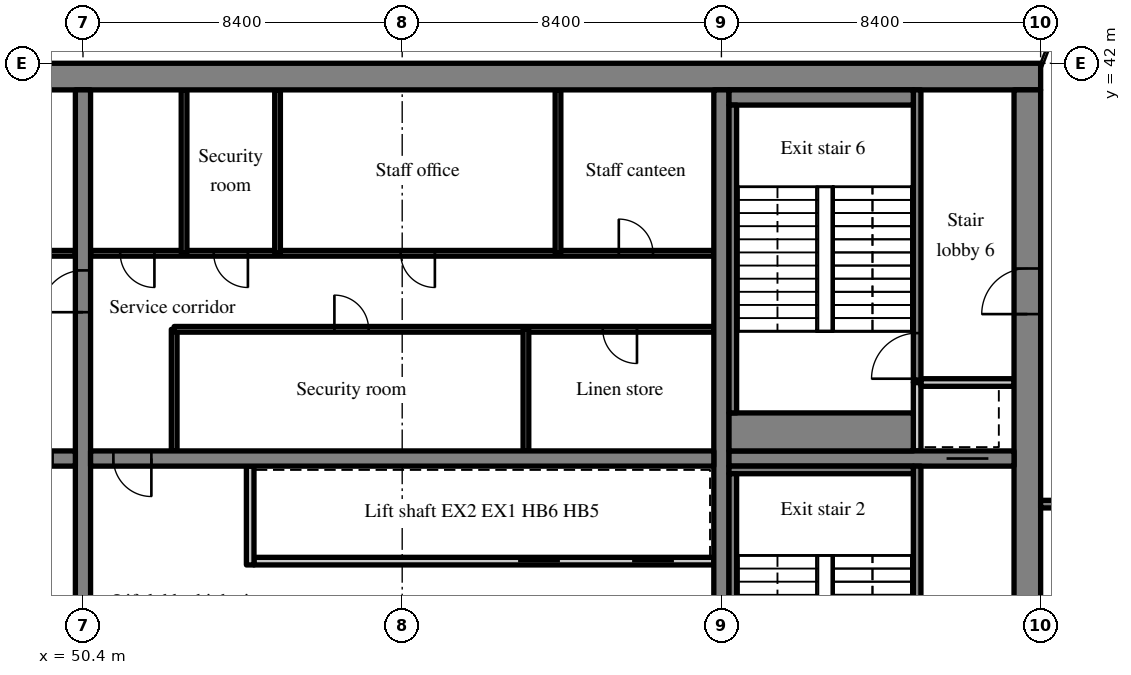
"""IFC4 building model, lengths in metres.
Left out: names, types, materials, properties, quantities, classifications, styles, units other than length and angle.
Written with IfcOpenShell. Run it as: python <this file> out.ifc"""

import sys

from ifc_helpers import new_model, si_unit, direction, frame, frame_2d, origin, place, context, subcontext, project, spatial, rectangle, extrude, source, transform, mapped, element, fill, save


model = new_model("IFC4")
c1 = context("Model", 3, precision=1e-05, world=origin(), true_north=direction((0.0, 1.0)))
c2 = subcontext(c1, "Body", "Model", "MODEL_VIEW")
j1 = project(units=[si_unit("LENGTHUNIT", "METRE"), si_unit("PLANEANGLEUNIT", "RADIAN")], contexts=[c1])
p1 = place(None, origin())
s1 = spatial("IfcSite", under=j1, at=p1, CompositionType="ELEMENT")
p2 = place(p1, origin())
s2 = spatial("IfcBuilding", under=s1, at=p2, CompositionType="ELEMENT")
p3 = place(p2, frame((0.0, 0.0, 185.8)))
s3 = spatial("IfcBuildingStorey", under=s2, at=p3, CompositionType="ELEMENT", Elevation=185.8)
m1 = source(origin(), c2, "Body", "SweptSolid", [
    extrude(rectangle(XDim=50.4, YDim=0.7, at=frame_2d((25.2, 0.0))), origin(), (0.0, 0.0, 1.0), 3.52),
])
p4 = place(p3, frame((25.2, 41.65, 0.0), z_axis=(0.0, 0.0, 1.0), x_axis=(1.0, 0.0, 0.0)))
e1 = element("IfcWall", 1, at=p4, inside=s3, PredefinedType="SHEAR", context=c2, shape_type="MappedRepresentation", body=[
    mapped(m1, transform((0.0, 0.0, 0.0), scale=1.0)),
])
m2 = source(origin(), c2, "Body", "SweptSolid", [
    extrude(rectangle(XDim=18.6, YDim=0.7, at=frame_2d((9.3, 0.0))), origin(), (0.0, 0.0, 1.0), 3.52),
])
p5 = place(p3, frame((75.25, 22.7, 0.0), z_axis=(0.0, 0.0, 1.0), x_axis=(0.0, 1.0, 0.0)))
e2 = element("IfcWall", 2, at=p5, inside=s3, PredefinedType="SHEAR", context=c2, shape_type="MappedRepresentation", body=[
    mapped(m2, transform((0.0, 0.0, 0.0), scale=1.0)),
])
m3 = source(origin(), c2, "Body", "SweptSolid", [
    extrude(rectangle(XDim=1.0, YDim=2.1, at=frame_2d((0.5, 1.05))), frame((0.0, 0.36, 0.0), z_axis=(0.0, -1.0, 0.0), x_axis=(1.0, 0.0, 0.0)), (0.0, 0.0, 1.0), 0.72),
])
p6 = place(p5, frame((2.8, 0.0, 0.0)))
e3 = element("IfcOpeningElement", 3, at=p6, cuts=e2, PredefinedType="OPENING", context=c2, shape_type="MappedRepresentation", body=[
    mapped(m3, transform((0.0, 0.0, 0.0), scale=1.0)),
])
m4 = source(origin(), c2, "Body", "SweptSolid", [
    extrude(rectangle(XDim=1.2, YDim=2.1, at=frame_2d((0.6, 1.05))), frame((0.0, 0.36, 0.0), z_axis=(0.0, -1.0, 0.0), x_axis=(1.0, 0.0, 0.0)), (0.0, 0.0, 1.0), 0.72),
])
p7 = place(p5, frame((12.7, 0.0, 0.0)))
e4 = element("IfcOpeningElement", 4, at=p7, cuts=e2, PredefinedType="OPENING", context=c2, shape_type="MappedRepresentation", body=[
    mapped(m4, transform((0.0, 0.0, 0.0), scale=1.0)),
])
m5 = source(origin(), c2, "Body", "SweptSolid", [
    extrude(rectangle(XDim=18.6, YDim=0.4, at=frame_2d((9.3, 0.0))), origin(), (0.0, 0.0, 1.0), 3.52),
])
p8 = place(p3, frame((50.4, 22.7, 0.0), z_axis=(0.0, 0.0, 1.0), x_axis=(0.0, 1.0, 0.0)))
e5 = element("IfcWall", 5, at=p8, inside=s3, PredefinedType="SHEAR", context=c2, shape_type="MappedRepresentation", body=[
    mapped(m5, transform((0.0, 0.0, 0.0), scale=1.0)),
])
m6 = source(origin(), c2, "Body", "SweptSolid", [
    extrude(rectangle(XDim=1.1, YDim=2.1, at=frame_2d((0.55, 1.05))), frame((0.0, 0.21, 0.0), z_axis=(0.0, -1.0, 0.0), x_axis=(1.0, 0.0, 0.0)), (0.0, 0.0, 1.0), 0.42),
])
p9 = place(p8, frame((12.75, 0.0, 0.0)))
e6 = element("IfcOpeningElement", 6, at=p9, cuts=e5, PredefinedType="OPENING", context=c2, shape_type="MappedRepresentation", body=[
    mapped(m6, transform((0.0, 0.0, 0.0), scale=1.0)),
])
p10 = place(p3, frame((67.2, 22.7, 0.0), z_axis=(0.0, 0.0, 1.0), x_axis=(0.0, 1.0, 0.0)))
e7 = element("IfcWall", 7, at=p10, inside=s3, PredefinedType="SHEAR", context=c2, shape_type="MappedRepresentation", body=[
    mapped(m5, transform((0.0, 0.0, 0.0), scale=1.0)),
])
m7 = source(origin(), c2, "Body", "SweptSolid", [
    extrude(rectangle(XDim=16.4, YDim=0.4, at=frame_2d((8.2, 0.0))), origin(), (0.0, 0.0, 1.0), 3.52),
])
p11 = place(p3, frame((33.8, 31.6, 0.0), z_axis=(0.0, 0.0, 1.0), x_axis=(1.0, 0.0, 0.0)))
e8 = element("IfcWall", 8, at=p11, inside=s3, PredefinedType="SHEAR", context=c2, shape_type="MappedRepresentation", body=[
    mapped(m7, transform((0.0, 0.0, 0.0), scale=1.0)),
])
m8 = source(origin(), c2, "Body", "SweptSolid", [
    extrude(rectangle(XDim=1.0, YDim=2.1, at=frame_2d((0.5, 1.05))), frame((0.0, 0.21, 0.0), z_axis=(0.0, -1.0, 0.0), x_axis=(1.0, 0.0, 0.0)), (0.0, 0.0, 1.0), 0.42),
])
p12 = place(p11, frame((14.8, 0.0, 0.0)))
e9 = element("IfcOpeningElement", 9, at=p12, cuts=e8, PredefinedType="OPENING", context=c2, shape_type="MappedRepresentation", body=[
    mapped(m8, transform((0.0, 0.0, 0.0), scale=1.0)),
])
p13 = place(p3, frame((50.6, 31.6, 0.0), z_axis=(0.0, 0.0, 1.0), x_axis=(1.0, 0.0, 0.0)))
e10 = element("IfcWall", 10, at=p13, inside=s3, PredefinedType="SHEAR", context=c2, shape_type="MappedRepresentation", body=[
    mapped(m7, transform((0.0, 0.0, 0.0), scale=1.0)),
])
p14 = place(p13, frame((0.6, 0.0, 0.0)))
e11 = element("IfcOpeningElement", 11, at=p14, cuts=e10, PredefinedType="OPENING", context=c2, shape_type="MappedRepresentation", body=[
    mapped(m8, transform((0.0, 0.0, 0.0), scale=1.0)),
])
m9 = source(origin(), c2, "Body", "SweptSolid", [
    extrude(rectangle(XDim=7.5, YDim=0.4, at=frame_2d((3.75, 0.0))), origin(), (0.0, 0.0, 1.0), 3.52),
])
p15 = place(p3, frame((67.4, 31.6, 0.0), z_axis=(0.0, 0.0, 1.0), x_axis=(1.0, 0.0, 0.0)))
e12 = element("IfcWall", 12, at=p15, inside=s3, PredefinedType="SHEAR", context=c2, shape_type="MappedRepresentation", body=[
    mapped(m9, transform((0.0, 0.0, 0.0), scale=1.0)),
])
p16 = place(p15, frame((5.725, 0.0, 0.0)))
e13 = element("IfcOpeningElement", 13, at=p16, cuts=e12, PredefinedType="OPENING", context=c2, shape_type="MappedRepresentation", body=[
    mapped(m6, transform((0.0, 0.0, 0.0), scale=1.0)),
])
m10 = source(origin(), c2, "Body", "SweptSolid", [
    extrude(rectangle(XDim=16.4, YDim=0.15, at=frame_2d((8.2, 0.0))), origin(), (0.0, 0.0, 1.0), 3.52),
])
p17 = place(p3, frame((33.8, 37.0, 0.0), z_axis=(0.0, 0.0, 1.0), x_axis=(1.0, 0.0, 0.0)))
e14 = element("IfcWall", 14, at=p17, inside=s3, PredefinedType="PARTITIONING", context=c2, shape_type="MappedRepresentation", body=[
    mapped(m10, transform((0.0, 0.0, 0.0), scale=1.0)),
])
m11 = source(origin(), c2, "Body", "SweptSolid", [
    extrude(rectangle(XDim=0.9, YDim=2.1, at=frame_2d((0.45, 1.05))), frame((0.0, 0.085, 0.0), z_axis=(0.0, -1.0, 0.0), x_axis=(1.0, 0.0, 0.0)), (0.0, 0.0, 1.0), 0.17),
])
p18 = place(p17, frame((6.52, 0.0, 0.0)))
e15 = element("IfcOpeningElement", 15, at=p18, cuts=e14, PredefinedType="OPENING", context=c2, shape_type="MappedRepresentation", body=[
    mapped(m11, transform((0.0, 0.0, 0.0), scale=1.0)),
])
p19 = place(p17, frame((14.72, 0.0, 0.0)))
e16 = element("IfcOpeningElement", 16, at=p19, cuts=e14, PredefinedType="OPENING", context=c2, shape_type="MappedRepresentation", body=[
    mapped(m11, transform((0.0, 0.0, 0.0), scale=1.0)),
])
m12 = source(origin(), c2, "Body", "SweptSolid", [
    extrude(rectangle(XDim=12.1, YDim=0.2, at=frame_2d((6.05, 0.0))), origin(), (0.0, 0.0, 1.0), 3.52),
])
p20 = place(p3, frame((67.0, 28.9, 0.0), z_axis=(0.0, 0.0, 1.0), x_axis=(-1.0, 0.0, 0.0)))
e17 = element("IfcWall", 17, at=p20, inside=s3, PredefinedType="SOLIDWALL", context=c2, shape_type="MappedRepresentation", body=[
    mapped(m12, transform((0.0, 0.0, 0.0), scale=1.0)),
])
m13 = source(origin(), c2, "Body", "SweptSolid", [
    extrude(rectangle(XDim=1.1, YDim=2.1, at=frame_2d((0.55, 1.05))), frame((0.0, 0.11, 0.0), z_axis=(0.0, -1.0, 0.0), x_axis=(1.0, 0.0, 0.0)), (0.0, 0.0, 1.0), 0.22),
])
p21 = place(p20, frame((1.05, 0.0, 0.0)))
e18 = element("IfcOpeningElement", 18, at=p21, cuts=e17, PredefinedType="OPENING", context=c2, shape_type="MappedRepresentation", body=[
    mapped(m13, transform((0.0, 0.0, 0.0), scale=1.0)),
])
p22 = place(p20, frame((4.05, 0.0, 0.0)))
e19 = element("IfcOpeningElement", 19, at=p22, cuts=e17, PredefinedType="OPENING", context=c2, shape_type="MappedRepresentation", body=[
    mapped(m13, transform((0.0, 0.0, 0.0), scale=1.0)),
])
m14 = source(origin(), c2, "Body", "SweptSolid", [
    extrude(rectangle(XDim=2.6, YDim=0.2, at=frame_2d((1.3, 0.0))), origin(), (0.0, 0.0, 1.0), 3.52),
])
p23 = place(p3, frame((54.8, 28.8, 0.0), z_axis=(0.0, 0.0, 1.0), x_axis=(0.0, 1.0, 0.0)))
e20 = element("IfcWall", 20, at=p23, inside=s3, PredefinedType="SOLIDWALL", context=c2, shape_type="MappedRepresentation", body=[
    mapped(m14, transform((0.0, 0.0, 0.0), scale=1.0)),
])
m15 = source(origin(), c2, "Body", "SweptSolid", [
    extrude(rectangle(XDim=3.2, YDim=0.15, at=frame_2d((1.6, 0.0))), origin(), (0.0, 0.0, 1.0), 3.52),
])
p24 = place(p3, frame((52.8, 31.8, 0.0), z_axis=(0.0, 0.0, 1.0), x_axis=(0.0, 1.0, 0.0)))
e21 = element("IfcWall", 21, at=p24, inside=s3, PredefinedType="PARTITIONING", context=c2, shape_type="MappedRepresentation", body=[
    mapped(m15, transform((0.0, 0.0, 0.0), scale=1.0)),
])
m16 = source(origin(), c2, "Body", "SweptSolid", [
    extrude(rectangle(XDim=14.2, YDim=0.15, at=frame_2d((7.1, 0.0))), origin(), (0.0, 0.0, 1.0), 3.52),
])
p25 = place(p3, frame((67.0, 35.0, 0.0), z_axis=(0.0, 0.0, 1.0), x_axis=(-1.0, 0.0, 0.0)))
e22 = element("IfcWall", 22, at=p25, inside=s3, PredefinedType="PARTITIONING", context=c2, shape_type="MappedRepresentation", body=[
    mapped(m16, transform((0.0, 0.0, 0.0), scale=1.0)),
])
p26 = place(p25, frame((2.022, 0.0, 0.0)))
e23 = element("IfcOpeningElement", 23, at=p26, cuts=e22, PredefinedType="OPENING", context=c2, shape_type="MappedRepresentation", body=[
    mapped(m11, transform((0.0, 0.0, 0.0), scale=1.0)),
])
p27 = place(p25, frame((9.084, 0.0, 0.0)))
e24 = element("IfcOpeningElement", 24, at=p27, cuts=e22, PredefinedType="OPENING", context=c2, shape_type="MappedRepresentation", body=[
    mapped(m11, transform((0.0, 0.0, 0.0), scale=1.0)),
])
p28 = place(p3, frame((67.0, 37.0, 0.0), z_axis=(0.0, 0.0, 1.0), x_axis=(-1.0, 0.0, 0.0)))
e25 = element("IfcWall", 25, at=p28, inside=s3, PredefinedType="PARTITIONING", context=c2, shape_type="MappedRepresentation", body=[
    mapped(m10, transform((0.0, 0.0, 0.0), scale=1.0)),
])
p29 = place(p28, frame((1.6, 0.0, 0.0)))
e26 = element("IfcOpeningElement", 26, at=p29, cuts=e25, PredefinedType="OPENING", context=c2, shape_type="MappedRepresentation", body=[
    mapped(m11, transform((0.0, 0.0, 0.0), scale=1.0)),
])
p30 = place(p28, frame((7.34, 0.0, 0.0)))
e27 = element("IfcOpeningElement", 27, at=p30, cuts=e25, PredefinedType="OPENING", context=c2, shape_type="MappedRepresentation", body=[
    mapped(m11, transform((0.0, 0.0, 0.0), scale=1.0)),
])
p31 = place(p28, frame((12.26, 0.0, 0.0)))
e28 = element("IfcOpeningElement", 28, at=p31, cuts=e25, PredefinedType="OPENING", context=c2, shape_type="MappedRepresentation", body=[
    mapped(m11, transform((0.0, 0.0, 0.0), scale=1.0)),
])
p32 = place(p28, frame((14.72, 0.0, 0.0)))
e29 = element("IfcOpeningElement", 29, at=p32, cuts=e25, PredefinedType="OPENING", context=c2, shape_type="MappedRepresentation", body=[
    mapped(m11, transform((0.0, 0.0, 0.0), scale=1.0)),
])
p33 = place(p3, frame((62.056, 31.8, 0.0), z_axis=(0.0, 0.0, 1.0), x_axis=(0.0, 1.0, 0.0)))
e30 = element("IfcWall", 30, at=p33, inside=s3, PredefinedType="PARTITIONING", context=c2, shape_type="MappedRepresentation", body=[
    mapped(m15, transform((0.0, 0.0, 0.0), scale=1.0)),
])
m17 = source(origin(), c2, "Body", "SweptSolid", [
    extrude(rectangle(XDim=4.3, YDim=0.15, at=frame_2d((2.15, 0.0))), origin(), (0.0, 0.0, 1.0), 3.52),
])
for number, where, z_axis, x_axis in (
    (31, (62.9, 37.0, 0.0), (0.0, 0.0, 1.0), (0.0, 1.0, 0.0)),
    (32, (55.52, 37.0, 0.0), (0.0, 0.0, 1.0), (0.0, 1.0, 0.0)),
    (33, (53.06, 37.0, 0.0), (0.0, 0.0, 1.0), (0.0, 1.0, 0.0)),
):
    element("IfcWall", number, at=place(p3, frame(where, z_axis=z_axis, x_axis=x_axis)), inside=s3, PredefinedType="PARTITIONING", context=c2, shape_type="MappedRepresentation", body=[
        mapped(m17, transform((0.0, 0.0, 0.0), scale=1.0)),
    ])
m18 = source(origin(), c2, "Body", "SweptSolid", [
    extrude(rectangle(XDim=8.7, YDim=0.2, at=frame_2d((4.35, 0.0))), origin(), (0.0, 0.0, 1.0), 3.52),
])
p34 = place(p3, frame((72.35, 22.7, 0.0), z_axis=(0.0, 0.0, 1.0), x_axis=(0.0, 1.0, 0.0)))
e34 = element("IfcWall", 34, at=p34, inside=s3, PredefinedType="SOLIDWALL", context=c2, shape_type="MappedRepresentation", body=[
    mapped(m18, transform((0.0, 0.0, 0.0), scale=1.0)),
])
m19 = source(origin(), c2, "Body", "SweptSolid", [
    extrude(rectangle(XDim=1.2, YDim=2.1, at=frame_2d((0.6, 1.05))), frame((0.0, 0.11, 0.0), z_axis=(0.0, -1.0, 0.0), x_axis=(1.0, 0.0, 0.0)), (0.0, 0.0, 1.0), 0.22),
])
p35 = place(p34, frame((0.9, 0.0, 0.0)))
e35 = element("IfcOpeningElement", 35, at=p35, cuts=e34, PredefinedType="OPENING", context=c2, shape_type="MappedRepresentation", body=[
    mapped(m19, transform((0.0, 0.0, 0.0), scale=1.0)),
])
m20 = source(origin(), c2, "Body", "SweptSolid", [
    extrude(rectangle(XDim=1.8, YDim=0.2, at=frame_2d((0.9, 0.0))), origin(), (0.0, 0.0, 1.0), 3.52),
])
p36 = place(p3, frame((72.35, 31.8, 0.0), z_axis=(0.0, 0.0, 1.0), x_axis=(0.0, 1.0, 0.0)))
e36 = element("IfcWall", 36, at=p36, inside=s3, PredefinedType="SOLIDWALL", context=c2, shape_type="MappedRepresentation", body=[
    mapped(m20, transform((0.0, 0.0, 0.0), scale=1.0)),
])
m21 = source(origin(), c2, "Body", "SweptSolid", [
    extrude(rectangle(XDim=2.45, YDim=0.2, at=frame_2d((1.225, 0.0))), origin(), (0.0, 0.0, 1.0), 3.52),
])
p37 = place(p3, frame((72.45, 33.6, 0.0), z_axis=(0.0, 0.0, 1.0), x_axis=(1.0, 0.0, 0.0)))
e37 = element("IfcWall", 37, at=p37, inside=s3, PredefinedType="SOLIDWALL", context=c2, shape_type="MappedRepresentation", body=[
    mapped(m21, transform((0.0, 0.0, 0.0), scale=1.0)),
])
m22 = source(origin(), c2, "Body", "SweptSolid", [
    extrude(rectangle(XDim=7.7, YDim=0.2, at=frame_2d((3.85, 0.0))), origin(), (0.0, 0.0, 1.0), 3.52),
])
p38 = place(p3, frame((72.35, 33.6, 0.0), z_axis=(0.0, 0.0, 1.0), x_axis=(0.0, 1.0, 0.0)))
e38 = element("IfcWall", 38, at=p38, inside=s3, PredefinedType="SOLIDWALL", context=c2, shape_type="MappedRepresentation", body=[
    mapped(m22, transform((0.0, 0.0, 0.0), scale=1.0)),
])
p39 = place(p38, frame((0.1, 0.0, 0.0)))
e39 = element("IfcOpeningElement", 39, at=p39, cuts=e38, PredefinedType="OPENING", context=c2, shape_type="MappedRepresentation", body=[
    mapped(m19, transform((0.0, 0.0, 0.0), scale=1.0)),
])
m23 = source(origin(), c2, "Body", "SweptSolid", [
    extrude(rectangle(XDim=8.25, YDim=0.2, at=frame_2d((4.125, 0.0))), origin(), (0.0, 0.0, 1.0), 3.52),
])
p40 = place(p3, frame((83.85, 30.4, 0.0), z_axis=(0.0, 0.0, 1.0), x_axis=(-1.0, 0.0, 0.0)))
e40 = element("IfcWall", 40, at=p40, inside=s3, PredefinedType="SOLIDWALL", context=c2, shape_type="MappedRepresentation", body=[
    mapped(m23, transform((0.0, 0.0, 0.0), scale=1.0)),
])
m24 = source(origin(), c2, "Body", "SweptSolid", [
    extrude(rectangle(XDim=1.0, YDim=2.1, at=frame_2d((0.5, 1.05))), frame((0.0, 0.11, 0.0), z_axis=(0.0, -1.0, 0.0), x_axis=(1.0, 0.0, 0.0)), (0.0, 0.0, 1.0), 0.22),
])
p41 = place(p40, frame((6.15, 0.0, 0.0)))
e41 = element("IfcOpeningElement", 41, at=p41, cuts=e40, PredefinedType="OPENING", context=c2, shape_type="MappedRepresentation", body=[
    mapped(m24, transform((0.0, 0.0, 0.0), scale=1.0)),
])
m25 = source(origin(), c2, "Body", "SweptSolid", [
    extrude(rectangle(XDim=4.85, YDim=0.2, at=frame_2d((2.425, 0.0))), origin(), (0.0, 0.0, 1.0), 3.52),
])
p42 = place(p3, frame((67.4, 31.3, 0.0), z_axis=(0.0, 0.0, 1.0), x_axis=(1.0, 0.0, 0.0)))
e42 = element("IfcWall", 42, at=p42, inside=s3, PredefinedType="SOLIDWALL", context=c2, shape_type="MappedRepresentation", body=[
    mapped(m25, transform((0.0, 0.0, 0.0), scale=1.0)),
])
m26 = source(origin(), c2, "Body", "SweptSolid", [
    extrude(rectangle(XDim=8.1, YDim=0.2, at=frame_2d((4.05, 0.0))), origin(), (0.0, 0.0, 1.0), 3.52),
])
p43 = place(p3, frame((67.5, 23.1, 0.0), z_axis=(0.0, 0.0, 1.0), x_axis=(0.0, 1.0, 0.0)))
e43 = element("IfcWall", 43, at=p43, inside=s3, PredefinedType="SOLIDWALL", context=c2, shape_type="MappedRepresentation", body=[
    mapped(m26, transform((0.0, 0.0, 0.0), scale=1.0)),
])
m27 = source(origin(), c2, "Body", "SweptSolid", [
    extrude(rectangle(XDim=4.85, YDim=0.4, at=frame_2d((2.425, 0.0))), origin(), (0.0, 0.0, 1.0), 3.52),
])
p44 = place(p3, frame((67.4, 41.1, 0.0), z_axis=(0.0, 0.0, 1.0), x_axis=(1.0, 0.0, 0.0)))
e44 = element("IfcWall", 44, at=p44, inside=s3, PredefinedType="SOLIDWALL", context=c2, shape_type="MappedRepresentation", body=[
    mapped(m27, transform((0.0, 0.0, 0.0), scale=1.0)),
])
m28 = source(origin(), c2, "Body", "SweptSolid", [
    extrude(rectangle(XDim=4.85, YDim=1.0, at=frame_2d((2.425, 0.0))), origin(), (0.0, 0.0, 1.0), 3.52),
])
p45 = place(p3, frame((67.4, 32.3, 0.0), z_axis=(0.0, 0.0, 1.0), x_axis=(1.0, 0.0, 0.0)))
e45 = element("IfcWall", 45, at=p45, inside=s3, PredefinedType="SOLIDWALL", context=c2, shape_type="MappedRepresentation", body=[
    mapped(m28, transform((0.0, 0.0, 0.0), scale=1.0)),
])
p46 = place(p3, frame((67.5, 32.8, 0.0), z_axis=(0.0, 0.0, 1.0), x_axis=(0.0, 1.0, 0.0)))
e46 = element("IfcWall", 46, at=p46, inside=s3, PredefinedType="SOLIDWALL", context=c2, shape_type="MappedRepresentation", body=[
    mapped(m26, transform((0.0, 0.0, 0.0), scale=1.0)),
])
m29 = source(origin(), c2, "Body", "SweptSolid", [
    extrude(rectangle(XDim=1.0, YDim=2.1, at=frame_2d((0.5, 1.05))), frame((0.0, 0.025, 0.0), z_axis=(0.0, -1.0, 0.0), x_axis=(1.0, 0.0, 0.0)), (0.0, 0.0, 1.0), 0.05),
])
p47 = place(p14, origin())
e47 = element("IfcDoor", 47, at=p47, inside=s3, OperationType="SINGLE_SWING_RIGHT", PredefinedType="DOOR", context=c2, shape_type="MappedRepresentation", body=[
    mapped(m29, transform((0.0, 0.0, 0.0), scale=1.0)),
])
fill(e11, e47)
m30 = source(origin(), c2, "Body", "SweptSolid", [
    extrude(rectangle(XDim=1.1, YDim=2.1, at=frame_2d((0.55, 1.05))), frame((0.0, 0.025, 0.0), z_axis=(0.0, -1.0, 0.0), x_axis=(1.0, 0.0, 0.0)), (0.0, 0.0, 1.0), 0.05),
])
p48 = place(p21, origin())
e48 = element("IfcDoor", 48, at=p48, inside=s3, OperationType="SLIDING_TO_RIGHT", PredefinedType="DOOR", context=c2, shape_type="MappedRepresentation", body=[
    mapped(m30, transform((0.0, 0.0, 0.0), scale=1.0)),
])
fill(e18, e48)
p49 = place(p22, origin())
e49 = element("IfcDoor", 49, at=p49, inside=s3, OperationType="SLIDING_TO_LEFT", PredefinedType="DOOR", context=c2, shape_type="MappedRepresentation", body=[
    mapped(m30, transform((0.0, 0.0, 0.0), scale=1.0)),
])
fill(e19, e49)
m31 = source(origin(), c2, "Body", "SweptSolid", [
    extrude(rectangle(XDim=0.9, YDim=2.1, at=frame_2d((0.45, 1.05))), frame((0.0, 0.025, 0.0), z_axis=(0.0, -1.0, 0.0), x_axis=(1.0, 0.0, 0.0)), (0.0, 0.0, 1.0), 0.05),
])
p50 = place(p26, origin())
e50 = element("IfcDoor", 50, at=p50, inside=s3, OperationType="SINGLE_SWING_LEFT", PredefinedType="DOOR", context=c2, shape_type="MappedRepresentation", body=[
    mapped(m31, transform((0.0, 0.0, 0.0), scale=1.0)),
])
fill(e23, e50)
p51 = place(p27, origin())
e51 = element("IfcDoor", 51, at=p51, inside=s3, OperationType="SINGLE_SWING_RIGHT", PredefinedType="DOOR", context=c2, shape_type="MappedRepresentation", body=[
    mapped(m31, transform((0.0, 0.0, 0.0), scale=1.0)),
])
fill(e24, e51)
p52 = place(p29, origin())
e52 = element("IfcDoor", 52, at=p52, inside=s3, OperationType="SINGLE_SWING_RIGHT", PredefinedType="DOOR", context=c2, shape_type="MappedRepresentation", body=[
    mapped(m31, transform((0.0, 0.0, 0.0), scale=1.0)),
])
fill(e26, e52)
p53 = place(p30, origin())
e53 = element("IfcDoor", 53, at=p53, inside=s3, OperationType="SINGLE_SWING_LEFT", PredefinedType="DOOR", context=c2, shape_type="MappedRepresentation", body=[
    mapped(m31, transform((0.0, 0.0, 0.0), scale=1.0)),
])
fill(e27, e53)
p54 = place(p31, origin())
e54 = element("IfcDoor", 54, at=p54, inside=s3, OperationType="SINGLE_SWING_LEFT", PredefinedType="DOOR", context=c2, shape_type="MappedRepresentation", body=[
    mapped(m31, transform((0.0, 0.0, 0.0), scale=1.0)),
])
fill(e28, e54)
p55 = place(p32, origin())
e55 = element("IfcDoor", 55, at=p55, inside=s3, OperationType="SINGLE_SWING_LEFT", PredefinedType="DOOR", context=c2, shape_type="MappedRepresentation", body=[
    mapped(m31, transform((0.0, 0.0, 0.0), scale=1.0)),
])
fill(e29, e55)
p56 = place(p16, origin())
e56 = element("IfcDoor", 56, at=p56, inside=s3, OperationType="SLIDING_TO_RIGHT", PredefinedType="DOOR", context=c2, shape_type="MappedRepresentation", body=[
    mapped(m30, transform((0.0, 0.0, 0.0), scale=1.0)),
])
fill(e13, e56)
m32 = source(origin(), c2, "Body", "SweptSolid", [
    extrude(rectangle(XDim=1.2, YDim=2.1, at=frame_2d((0.6, 1.05))), frame((0.0, 0.025, 0.0), z_axis=(0.0, -1.0, 0.0), x_axis=(1.0, 0.0, 0.0)), (0.0, 0.0, 1.0), 0.05),
])
p57 = place(p39, origin())
e57 = element("IfcDoor", 57, at=p57, inside=s3, OperationType="SINGLE_SWING_LEFT", PredefinedType="DOOR", context=c2, shape_type="MappedRepresentation", body=[
    mapped(m32, transform((0.0, 0.0, 0.0), scale=1.0)),
])
fill(e39, e57)
p58 = place(p7, origin())
e58 = element("IfcDoor", 58, at=p58, inside=s3, OperationType="SINGLE_SWING_LEFT", PredefinedType="DOOR", context=c2, shape_type="MappedRepresentation", body=[
    mapped(m32, transform((0.0, 0.0, 0.0), scale=1.0)),
])
fill(e4, e58)
p59 = place(p9, origin())
e59 = element("IfcDoor", 59, at=p59, inside=s3, OperationType="SINGLE_SWING_LEFT", PredefinedType="DOOR", context=c2, shape_type="MappedRepresentation", body=[
    mapped(m30, transform((0.0, 0.0, 0.0), scale=1.0)),
])
fill(e6, e59)
save(model, sys.argv[1])
